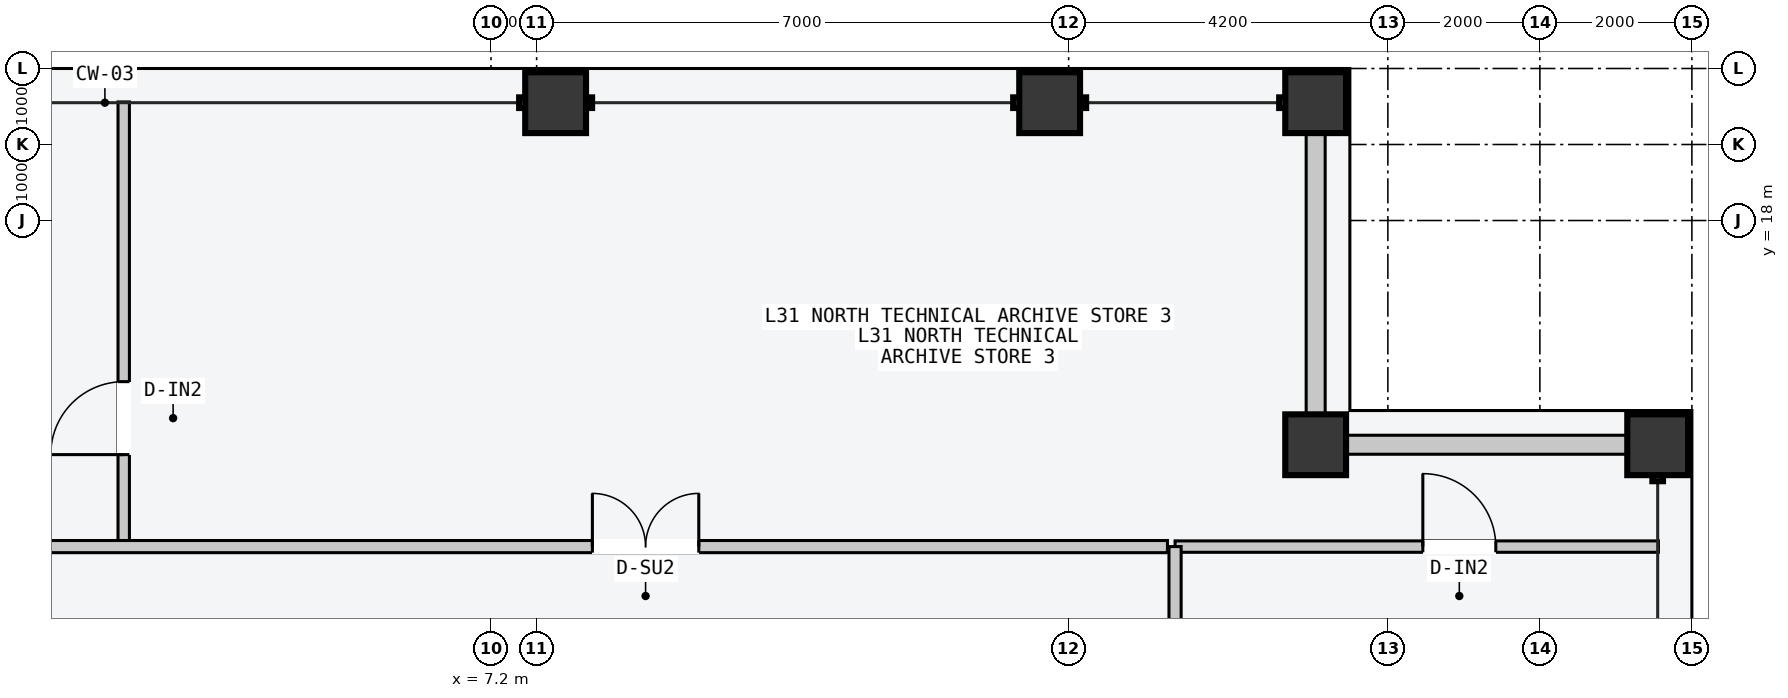
"""IFC4 building model, lengths in metres.
Left out: names, types, materials, properties, quantities, classifications, styles, units other than length and angle.
Written with IfcOpenShell. Run it as: python <this file> out.ifc"""

import sys

from ifc_helpers import new_model, si_unit, direction, frame, frame_2d, origin, origin_2d, place, context, subcontext, project, spatial, rectangle, hollow_rectangle, extrude, element, fill, save


model = new_model("IFC4")
c1 = context("Model", 3, precision=1e-05, world=origin(), true_north=direction((0.0, 1.0)))
c2 = subcontext(c1, "Body", "Model", "MODEL_VIEW")
j1 = project(units=[si_unit("LENGTHUNIT", "METRE"), si_unit("PLANEANGLEUNIT", "RADIAN")], contexts=[c1])
p1 = place(None, origin())
s1 = spatial("IfcSite", under=j1, at=p1, CompositionType="ELEMENT")
p2 = place(p1, origin())
s2 = spatial("IfcBuilding", under=s1, at=p2, CompositionType="ELEMENT")
p3 = place(p2, frame((0.0, 0.0, 120.6)))
s3 = spatial("IfcBuildingStorey", under=s2, at=p3, CompositionType="ELEMENT", Elevation=120.6)
for number, where, z_axis, x_axis in (
    (1, (8.05, 19.55, 0.0), (0.0, 0.0, 1.0), (1.0, 0.0, 0.0)),
    (2, (14.55, 19.55, 0.0), (0.0, 0.0, 1.0), (1.0, 0.0, 0.0)),
    (3, (18.05, 19.55, 0.0), (0.0, 0.0, 1.0), (1.0, 0.0, 0.0)),
    (4, (22.55, 15.05, 0.0), (0.0, 0.0, 1.0), (0.0, 1.0, 0.0)),
    (5, (18.05, 15.05, 0.0), (0.0, 0.0, 1.0), (1.0, 0.0, 0.0)),
):
    element("IfcColumn", number, at=place(p3, frame(where, z_axis=z_axis, x_axis=x_axis)), inside=s3, PredefinedType="COLUMN", context=c2, shape_type="SweptSolid", body=[
        extrude(hollow_rectangle(XDim=0.8, YDim=0.8, WallThickness=0.036, at=origin_2d()), origin(), (0.0, 0.0, 1.0), 3.6),
    ])
for number, where, z_axis, x_axis in (
    (6, (18.46, 15.05, 0.0), (0.0, 0.0, 1.0), (1.0, 0.0, 0.0)),
    (7, (18.05, 15.46, 0.0), (0.0, 0.0, 1.0), (0.0, 1.0, 0.0)),
):
    element("IfcWall", number, at=place(p3, frame(where, z_axis=z_axis, x_axis=x_axis)), inside=s3, PredefinedType="STANDARD", context=c2, shape_type="SweptSolid", body=[
        extrude(rectangle(XDim=3.68, YDim=0.25, at=frame_2d((1.84, 0.0))), origin(), (0.0, 0.0, 1.0), 2.75),
    ])
p4 = place(p3, frame((2.367, 13.77, 0.0), z_axis=(0.0, 0.0, 1.0), x_axis=(0.0, 1.0, 0.0)))
e8 = element("IfcWall", 8, at=p4, inside=s3, PredefinedType="PARTITIONING", context=c2, shape_type="SweptSolid", body=[
    extrude(rectangle(XDim=5.79, YDim=0.15, at=frame_2d((2.895, 0.0))), origin(), (0.0, 0.0, 1.0), 3.4),
])
p5 = place(p4, frame((1.15, 0.0, 0.0)))
e9 = element("IfcOpeningElement", 9, at=p5, cuts=e8, PredefinedType="OPENING", context=c2, shape_type="SweptSolid", body=[
    extrude(rectangle(XDim=0.96, YDim=2.18, at=frame_2d((0.48, 1.09))), frame((0.0, 0.085, 0.0), z_axis=(0.0, -1.0, 0.0), x_axis=(1.0, 0.0, 0.0)), (0.0, 0.0, 1.0), 0.17),
])
p6 = place(p3, frame((-16.1, 13.71, 0.0), z_axis=(0.0, 0.0, 1.0), x_axis=(1.0, 0.0, 0.0)))
e10 = element("IfcWall", 10, at=p6, inside=s3, PredefinedType="PARTITIONING", context=c2, shape_type="SweptSolid", body=[
    extrude(rectangle(XDim=32.2, YDim=0.16, at=frame_2d((16.1, 0.0))), origin(), (0.0, 0.0, 1.0), 3.4),
])
p7 = place(p6, frame((2.954, 0.0, 0.0)))
e11 = element("IfcOpeningElement", 11, at=p7, cuts=e10, PredefinedType="OPENING", context=c2, shape_type="SweptSolid", body=[
    extrude(rectangle(XDim=1.06, YDim=2.2, at=frame_2d((0.53, 1.1))), frame((0.0, 0.09, 0.0), z_axis=(0.0, -1.0, 0.0), x_axis=(1.0, 0.0, 0.0)), (0.0, 0.0, 1.0), 0.18),
])
p8 = place(p6, frame((12.098, 0.0, 0.0)))
e12 = element("IfcOpeningElement", 12, at=p8, cuts=e10, PredefinedType="OPENING", context=c2, shape_type="SweptSolid", body=[
    extrude(rectangle(XDim=1.24, YDim=2.24, at=frame_2d((0.62, 1.12))), frame((0.0, 0.09, 0.0), z_axis=(0.0, -1.0, 0.0), x_axis=(1.0, 0.0, 0.0)), (0.0, 0.0, 1.0), 0.18),
])
p9 = place(p6, frame((24.634, 0.0, 0.0)))
e13 = element("IfcOpeningElement", 13, at=p9, cuts=e10, PredefinedType="OPENING", context=c2, shape_type="SweptSolid", body=[
    extrude(rectangle(XDim=1.4, YDim=2.2, at=frame_2d((0.7, 1.1))), frame((0.0, 0.09, 0.0), z_axis=(0.0, -1.0, 0.0), x_axis=(1.0, 0.0, 0.0)), (0.0, 0.0, 1.0), 0.18),
])
p10 = place(p3, frame((16.2, 13.71, 0.0), z_axis=(0.0, 0.0, 1.0), x_axis=(1.0, 0.0, 0.0)))
e14 = element("IfcWall", 14, at=p10, inside=s3, PredefinedType="PARTITIONING", context=c2, shape_type="SweptSolid", body=[
    extrude(rectangle(XDim=6.36, YDim=0.15, at=frame_2d((3.18, 0.0))), origin(), (0.0, 0.0, 1.0), 3.4),
])
p11 = place(p10, frame((3.26, 0.0, 0.0)))
e15 = element("IfcOpeningElement", 15, at=p11, cuts=e14, PredefinedType="OPENING", context=c2, shape_type="SweptSolid", body=[
    extrude(rectangle(XDim=0.96, YDim=2.18, at=frame_2d((0.48, 1.09))), frame((0.0, 0.085, 0.0), z_axis=(0.0, -1.0, 0.0), x_axis=(1.0, 0.0, 0.0)), (0.0, 0.0, 1.0), 0.17),
])
p12 = place(p3, frame((16.2, 11.76, 0.0), z_axis=(0.0, 0.0, 1.0), x_axis=(0.0, 1.0, 0.0)))
e16 = element("IfcWall", 16, at=p12, inside=s3, PredefinedType="PARTITIONING", context=c2, shape_type="SweptSolid", body=[
    extrude(rectangle(XDim=1.95, YDim=0.16, at=frame_2d((0.975, 0.0))), origin(), (0.0, 0.0, 1.0), 3.4),
])
p13 = place(p5, origin())
e17 = element("IfcDoor", 17, at=p13, inside=s3, OperationType="SINGLE_SWING_LEFT", PredefinedType="DOOR", context=c2, shape_type="SweptSolid", body=[
    extrude(rectangle(XDim=0.96, YDim=2.18, at=frame_2d((0.48, 1.09))), frame((0.0, 0.025, 0.0), z_axis=(0.0, -1.0, 0.0), x_axis=(1.0, 0.0, 0.0)), (0.0, 0.0, 1.0), 0.05),
])
fill(e9, e17)
p14 = place(p9, origin())
e18 = element("IfcDoor", 18, at=p14, inside=s3, OperationType="DOUBLE_DOOR_SINGLE_SWING", PredefinedType="DOOR", context=c2, shape_type="SweptSolid", body=[
    extrude(rectangle(XDim=1.4, YDim=2.2, at=frame_2d((0.7, 1.1))), frame((0.0, 0.025, 0.0), z_axis=(0.0, -1.0, 0.0), x_axis=(1.0, 0.0, 0.0)), (0.0, 0.0, 1.0), 0.05),
])
fill(e13, e18)
p15 = place(p11, origin())
e19 = element("IfcDoor", 19, at=p15, inside=s3, OperationType="SINGLE_SWING_LEFT", PredefinedType="DOOR", context=c2, shape_type="SweptSolid", body=[
    extrude(rectangle(XDim=0.96, YDim=2.18, at=frame_2d((0.48, 1.09))), frame((0.0, 0.025, 0.0), z_axis=(0.0, -1.0, 0.0), x_axis=(1.0, 0.0, 0.0)), (0.0, 0.0, 1.0), 0.05),
])
fill(e15, e19)
save(model, sys.argv[1])
